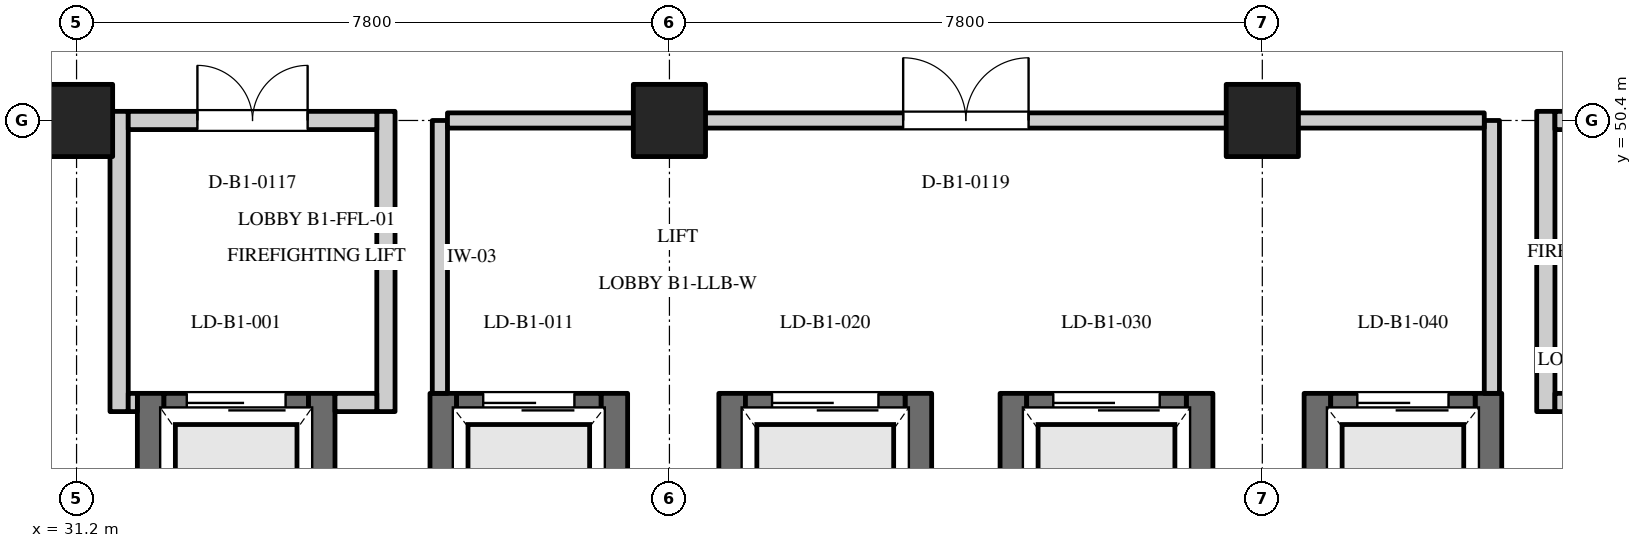
"""IFC4 building model, lengths in metres.
Left out: names, types, materials, properties, quantities, classifications, styles, units other than length and angle.
Written with IfcOpenShell. Run it as: python <this file> out.ifc"""

import sys

from ifc_helpers import new_model, si_unit, direction, frame, frame_2d, origin, origin_2d, place, context, subcontext, project, spatial, rectangle, extrude, element, fill, save


model = new_model("IFC4")
c1 = context("Model", 3, precision=1e-05, world=origin(), true_north=direction((0.0, 1.0)))
c2 = subcontext(c1, "Body", "Model", "MODEL_VIEW")
j1 = project(units=[si_unit("LENGTHUNIT", "METRE"), si_unit("PLANEANGLEUNIT", "RADIAN")], contexts=[c1])
p1 = place(None, origin())
s1 = spatial("IfcSite", under=j1, at=p1, CompositionType="ELEMENT")
p2 = place(p1, origin())
s2 = spatial("IfcBuilding", under=s1, at=p2, CompositionType="ELEMENT")
p3 = place(p2, frame((0.0, 0.0, -4.5)))
s3 = spatial("IfcBuildingStorey", under=s2, at=p3, CompositionType="ELEMENT", Elevation=-4.5)
for number, where, z_axis, x_axis in (
    (1, (31.2, 50.4, 0.0), (0.0, 0.0, 1.0), (1.0, 0.0, 0.0)),
    (2, (39.0, 50.4, 0.0), (0.0, 0.0, 1.0), (1.0, 0.0, 0.0)),
    (3, (46.8, 50.4, 0.0), (0.0, 0.0, 1.0), (1.0, 0.0, 0.0)),
):
    element("IfcColumn", number, at=place(p3, frame(where, z_axis=z_axis, x_axis=x_axis)), inside=s3, PredefinedType="COLUMN", context=c2, shape_type="SweptSolid", body=[
        extrude(rectangle(XDim=0.95, YDim=0.95, at=origin_2d()), origin(), (0.0, 0.0, 1.0), 4.5),
    ])
for number, where, z_axis, x_axis in (
    (4, (32.175, 43.06, 0.0), (0.0, 0.0, 1.0), (0.0, 1.0, 0.0)),
    (5, (34.425, 43.06, 0.0), (0.0, 0.0, 1.0), (0.0, 1.0, 0.0)),
):
    element("IfcWall", number, at=place(p3, frame(where, z_axis=z_axis, x_axis=x_axis)), inside=s3, PredefinedType="SHEAR", context=c2, shape_type="SweptSolid", body=[
        extrude(rectangle(XDim=3.75, YDim=0.35, at=frame_2d((1.875, 0.0))), origin(), (0.0, 0.0, 1.0), 4.5),
    ])
p4 = place(p3, frame((32.35, 46.635, 0.0), z_axis=(0.0, 0.0, 1.0), x_axis=(1.0, 0.0, 0.0)))
e6 = element("IfcWall", 6, at=p4, inside=s3, PredefinedType="SHEAR", context=c2, shape_type="SweptSolid", body=[
    extrude(rectangle(XDim=1.9, YDim=0.35, at=frame_2d((0.95, 0.0))), origin(), (0.0, 0.0, 1.0), 4.15),
])
p5 = place(p4, frame((0.3, 0.0, 0.0)))
e7 = element("IfcOpeningElement", 7, at=p5, cuts=e6, PredefinedType="OPENING", context=c2, shape_type="SweptSolid", body=[
    extrude(rectangle(XDim=1.3, YDim=2.2, at=frame_2d((0.65, 1.1))), frame((0.0, 0.187, 0.0), z_axis=(0.0, -1.0, 0.0), x_axis=(1.0, 0.0, 0.0)), (0.0, 0.0, 1.0), 0.374),
])
for number, where, z_axis, x_axis in (
    (8, (36.025, 43.36, 0.0), (0.0, 0.0, 1.0), (0.0, 1.0, 0.0)),
    (9, (38.275, 43.36, 0.0), (0.0, 0.0, 1.0), (0.0, 1.0, 0.0)),
):
    element("IfcWall", number, at=place(p3, frame(where, z_axis=z_axis, x_axis=x_axis)), inside=s3, PredefinedType="SHEAR", context=c2, shape_type="SweptSolid", body=[
        extrude(rectangle(XDim=3.45, YDim=0.35, at=frame_2d((1.725, 0.0))), origin(), (0.0, 0.0, 1.0), 4.5),
    ])
p6 = place(p3, frame((36.2, 46.635, 0.0), z_axis=(0.0, 0.0, 1.0), x_axis=(1.0, 0.0, 0.0)))
e10 = element("IfcWall", 10, at=p6, inside=s3, PredefinedType="SHEAR", context=c2, shape_type="SweptSolid", body=[
    extrude(rectangle(XDim=1.9, YDim=0.35, at=frame_2d((0.95, 0.0))), origin(), (0.0, 0.0, 1.0), 4.15),
])
p7 = place(p6, frame((0.35, 0.0, 0.0)))
e11 = element("IfcOpeningElement", 11, at=p7, cuts=e10, PredefinedType="OPENING", context=c2, shape_type="SweptSolid", body=[
    extrude(rectangle(XDim=1.2, YDim=2.2, at=frame_2d((0.6, 1.1))), frame((0.0, 0.187, 0.0), z_axis=(0.0, -1.0, 0.0), x_axis=(1.0, 0.0, 0.0)), (0.0, 0.0, 1.0), 0.374),
])
for number, where, z_axis, x_axis in (
    (12, (39.825, 42.76, 0.0), (0.0, 0.0, 1.0), (0.0, 1.0, 0.0)),
    (13, (42.275, 42.76, 0.0), (0.0, 0.0, 1.0), (0.0, 1.0, 0.0)),
):
    element("IfcWall", number, at=place(p3, frame(where, z_axis=z_axis, x_axis=x_axis)), inside=s3, PredefinedType="SHEAR", context=c2, shape_type="SweptSolid", body=[
        extrude(rectangle(XDim=4.05, YDim=0.35, at=frame_2d((2.025, 0.0))), origin(), (0.0, 0.0, 1.0), 4.5),
    ])
p8 = place(p3, frame((40.0, 46.635, 0.0), z_axis=(0.0, 0.0, 1.0), x_axis=(1.0, 0.0, 0.0)))
e14 = element("IfcWall", 14, at=p8, inside=s3, PredefinedType="SHEAR", context=c2, shape_type="SweptSolid", body=[
    extrude(rectangle(XDim=2.1, YDim=0.35, at=frame_2d((1.05, 0.0))), origin(), (0.0, 0.0, 1.0), 4.15),
])
p9 = place(p8, frame((0.35, 0.0, 0.0)))
e15 = element("IfcOpeningElement", 15, at=p9, cuts=e14, PredefinedType="OPENING", context=c2, shape_type="SweptSolid", body=[
    extrude(rectangle(XDim=1.4, YDim=2.2, at=frame_2d((0.7, 1.1))), frame((0.0, 0.187, 0.0), z_axis=(0.0, -1.0, 0.0), x_axis=(1.0, 0.0, 0.0)), (0.0, 0.0, 1.0), 0.374),
])
for number, where, z_axis, x_axis in (
    (16, (43.525, 42.76, 0.0), (0.0, 0.0, 1.0), (0.0, 1.0, 0.0)),
    (17, (45.975, 42.76, 0.0), (0.0, 0.0, 1.0), (0.0, 1.0, 0.0)),
):
    element("IfcWall", number, at=place(p3, frame(where, z_axis=z_axis, x_axis=x_axis)), inside=s3, PredefinedType="SHEAR", context=c2, shape_type="SweptSolid", body=[
        extrude(rectangle(XDim=4.05, YDim=0.35, at=frame_2d((2.025, 0.0))), origin(), (0.0, 0.0, 1.0), 4.5),
    ])
p10 = place(p3, frame((43.7, 46.635, 0.0), z_axis=(0.0, 0.0, 1.0), x_axis=(1.0, 0.0, 0.0)))
e18 = element("IfcWall", 18, at=p10, inside=s3, PredefinedType="SHEAR", context=c2, shape_type="SweptSolid", body=[
    extrude(rectangle(XDim=2.1, YDim=0.35, at=frame_2d((1.05, 0.0))), origin(), (0.0, 0.0, 1.0), 4.15),
])
p11 = place(p10, frame((0.35, 0.0, 0.0)))
e19 = element("IfcOpeningElement", 19, at=p11, cuts=e18, PredefinedType="OPENING", context=c2, shape_type="SweptSolid", body=[
    extrude(rectangle(XDim=1.4, YDim=2.2, at=frame_2d((0.7, 1.1))), frame((0.0, 0.187, 0.0), z_axis=(0.0, -1.0, 0.0), x_axis=(1.0, 0.0, 0.0)), (0.0, 0.0, 1.0), 0.374),
])
for number, where, z_axis, x_axis in (
    (20, (47.525, 43.36, 0.0), (0.0, 0.0, 1.0), (0.0, 1.0, 0.0)),
    (21, (49.775, 43.36, 0.0), (0.0, 0.0, 1.0), (0.0, 1.0, 0.0)),
):
    element("IfcWall", number, at=place(p3, frame(where, z_axis=z_axis, x_axis=x_axis)), inside=s3, PredefinedType="SHEAR", context=c2, shape_type="SweptSolid", body=[
        extrude(rectangle(XDim=3.45, YDim=0.35, at=frame_2d((1.725, 0.0))), origin(), (0.0, 0.0, 1.0), 4.5),
    ])
p12 = place(p3, frame((47.7, 46.635, 0.0), z_axis=(0.0, 0.0, 1.0), x_axis=(1.0, 0.0, 0.0)))
e22 = element("IfcWall", 22, at=p12, inside=s3, PredefinedType="SHEAR", context=c2, shape_type="SweptSolid", body=[
    extrude(rectangle(XDim=1.9, YDim=0.35, at=frame_2d((0.95, 0.0))), origin(), (0.0, 0.0, 1.0), 4.15),
])
p13 = place(p12, frame((0.35, 0.0, 0.0)))
e23 = element("IfcOpeningElement", 23, at=p13, cuts=e22, PredefinedType="OPENING", context=c2, shape_type="SweptSolid", body=[
    extrude(rectangle(XDim=1.2, YDim=2.2, at=frame_2d((0.6, 1.1))), frame((0.0, 0.187, 0.0), z_axis=(0.0, -1.0, 0.0), x_axis=(1.0, 0.0, 0.0)), (0.0, 0.0, 1.0), 0.374),
])
for number, where, z_axis, x_axis in (
    (24, (31.76, 46.57, 0.0), (0.0, 0.0, 1.0), (0.0, 1.0, 0.0)),
    (25, (35.27, 46.57, 0.0), (0.0, 0.0, 1.0), (0.0, 1.0, 0.0)),
):
    element("IfcWall", number, at=place(p3, frame(where, z_axis=z_axis, x_axis=x_axis)), inside=s3, PredefinedType="STANDARD", context=c2, shape_type="SweptSolid", body=[
        extrude(rectangle(XDim=3.95, YDim=0.24, at=frame_2d((1.975, 0.0))), origin(), (0.0, 0.0, 1.0), 3.4),
    ])
p14 = place(p3, frame((31.88, 46.69, 0.0), z_axis=(0.0, 0.0, 1.0), x_axis=(1.0, 0.0, 0.0)))
e26 = element("IfcWall", 26, at=p14, inside=s3, PredefinedType="STANDARD", context=c2, shape_type="SweptSolid", body=[
    extrude(rectangle(XDim=0.12, YDim=0.24, at=frame_2d((0.06, 0.0))), origin(), (0.0, 0.0, 1.0), 3.4),
])
p15 = place(p3, frame((34.6, 46.69, 0.0), z_axis=(0.0, 0.0, 1.0), x_axis=(1.0, 0.0, 0.0)))
e27 = element("IfcWall", 27, at=p15, inside=s3, PredefinedType="STANDARD", context=c2, shape_type="SweptSolid", body=[
    extrude(rectangle(XDim=0.55, YDim=0.24, at=frame_2d((0.275, 0.0))), origin(), (0.0, 0.0, 1.0), 3.4),
])
p16 = place(p3, frame((31.88, 50.4, 0.0), z_axis=(0.0, 0.0, 1.0), x_axis=(1.0, 0.0, 0.0)))
e28 = element("IfcWall", 28, at=p16, inside=s3, PredefinedType="STANDARD", context=c2, shape_type="SweptSolid", body=[
    extrude(rectangle(XDim=3.27, YDim=0.24, at=frame_2d((1.635, 0.0))), origin(), (0.0, 0.0, 1.0), 3.4),
])
p17 = place(p16, frame((0.91, 0.0, 0.0)))
e29 = element("IfcOpeningElement", 29, at=p17, cuts=e28, PredefinedType="OPENING", context=c2, shape_type="SweptSolid", body=[
    extrude(rectangle(XDim=1.45, YDim=2.2, at=frame_2d((0.725, 1.1))), frame((0.0, 0.132, 0.0), z_axis=(0.0, -1.0, 0.0), x_axis=(1.0, 0.0, 0.0)), (0.0, 0.0, 1.0), 0.264),
])
p18 = place(p3, frame((50.53, 46.57, 0.0), z_axis=(0.0, 0.0, 1.0), x_axis=(0.0, 1.0, 0.0)))
e30 = element("IfcWall", 30, at=p18, inside=s3, PredefinedType="STANDARD", context=c2, shape_type="SweptSolid", body=[
    extrude(rectangle(XDim=3.95, YDim=0.24, at=frame_2d((1.975, 0.0))), origin(), (0.0, 0.0, 1.0), 3.4),
])
p19 = place(p3, frame((50.65, 46.69, 0.0), z_axis=(0.0, 0.0, 1.0), x_axis=(1.0, 0.0, 0.0)))
e31 = element("IfcWall", 31, at=p19, inside=s3, PredefinedType="STANDARD", context=c2, shape_type="SweptSolid", body=[
    extrude(rectangle(XDim=0.5, YDim=0.24, at=frame_2d((0.25, 0.0))), origin(), (0.0, 0.0, 1.0), 3.4),
])
p20 = place(p3, frame((50.65, 50.4, 0.0), z_axis=(0.0, 0.0, 1.0), x_axis=(1.0, 0.0, 0.0)))
e32 = element("IfcWall", 32, at=p20, inside=s3, PredefinedType="STANDARD", context=c2, shape_type="SweptSolid", body=[
    extrude(rectangle(XDim=3.37, YDim=0.24, at=frame_2d((1.685, 0.0))), origin(), (0.0, 0.0, 1.0), 3.4),
])
p21 = place(p20, frame((0.96, 0.0, 0.0)))
e33 = element("IfcOpeningElement", 33, at=p21, cuts=e32, PredefinedType="OPENING", context=c2, shape_type="SweptSolid", body=[
    extrude(rectangle(XDim=1.45, YDim=2.2, at=frame_2d((0.725, 1.1))), frame((0.0, 0.132, 0.0), z_axis=(0.0, -1.0, 0.0), x_axis=(1.0, 0.0, 0.0)), (0.0, 0.0, 1.0), 0.264),
])
for number, where, z_axis, x_axis in (
    (34, (35.98, 46.81, 0.0), (0.0, 0.0, 1.0), (0.0, 1.0, 0.0)),
    (35, (49.82, 46.81, 0.0), (0.0, 0.0, 1.0), (0.0, 1.0, 0.0)),
):
    element("IfcWall", number, at=place(p3, frame(where, z_axis=z_axis, x_axis=x_axis)), inside=s3, PredefinedType="STANDARD", context=c2, shape_type="SweptSolid", body=[
        extrude(rectangle(XDim=3.59, YDim=0.2, at=frame_2d((1.795, 0.0))), origin(), (0.0, 0.0, 1.0), 3.4),
    ])
p22 = place(p3, frame((36.08, 50.4, 0.0), z_axis=(0.0, 0.0, 1.0), x_axis=(1.0, 0.0, 0.0)))
e36 = element("IfcWall", 36, at=p22, inside=s3, PredefinedType="STANDARD", context=c2, shape_type="SweptSolid", body=[
    extrude(rectangle(XDim=13.64, YDim=0.2, at=frame_2d((6.82, 0.0))), origin(), (0.0, 0.0, 1.0), 3.4),
])
p23 = place(p22, frame((5.995, 0.0, 0.0)))
e37 = element("IfcOpeningElement", 37, at=p23, cuts=e36, PredefinedType="OPENING", context=c2, shape_type="SweptSolid", body=[
    extrude(rectangle(XDim=1.65, YDim=2.25, at=frame_2d((0.825, 1.125))), frame((0.0, 0.112, 0.0), z_axis=(0.0, -1.0, 0.0), x_axis=(1.0, 0.0, 0.0)), (0.0, 0.0, 1.0), 0.224),
])
p24 = place(p5, origin())
e38 = element("IfcDoor", 38, at=p24, inside=s3, OperationType="SLIDING_TO_LEFT", PredefinedType="DOOR", context=c2, shape_type="SweptSolid", body=[
    extrude(rectangle(XDim=1.3, YDim=2.2, at=frame_2d((0.65, 1.1))), frame((0.0, 0.025, 0.0), z_axis=(0.0, -1.0, 0.0), x_axis=(1.0, 0.0, 0.0)), (0.0, 0.0, 1.0), 0.05),
])
fill(e7, e38)
p25 = place(p7, origin())
e39 = element("IfcDoor", 39, at=p25, inside=s3, OperationType="SLIDING_TO_LEFT", PredefinedType="DOOR", context=c2, shape_type="SweptSolid", body=[
    extrude(rectangle(XDim=1.2, YDim=2.2, at=frame_2d((0.6, 1.1))), frame((0.0, 0.025, 0.0), z_axis=(0.0, -1.0, 0.0), x_axis=(1.0, 0.0, 0.0)), (0.0, 0.0, 1.0), 0.05),
])
fill(e11, e39)
p26 = place(p9, origin())
e40 = element("IfcDoor", 40, at=p26, inside=s3, OperationType="SLIDING_TO_LEFT", PredefinedType="DOOR", context=c2, shape_type="SweptSolid", body=[
    extrude(rectangle(XDim=1.4, YDim=2.2, at=frame_2d((0.7, 1.1))), frame((0.0, 0.025, 0.0), z_axis=(0.0, -1.0, 0.0), x_axis=(1.0, 0.0, 0.0)), (0.0, 0.0, 1.0), 0.05),
])
fill(e15, e40)
p27 = place(p11, origin())
e41 = element("IfcDoor", 41, at=p27, inside=s3, OperationType="SLIDING_TO_LEFT", PredefinedType="DOOR", context=c2, shape_type="SweptSolid", body=[
    extrude(rectangle(XDim=1.4, YDim=2.2, at=frame_2d((0.7, 1.1))), frame((0.0, 0.025, 0.0), z_axis=(0.0, -1.0, 0.0), x_axis=(1.0, 0.0, 0.0)), (0.0, 0.0, 1.0), 0.05),
])
fill(e19, e41)
p28 = place(p13, origin())
e42 = element("IfcDoor", 42, at=p28, inside=s3, OperationType="SLIDING_TO_LEFT", PredefinedType="DOOR", context=c2, shape_type="SweptSolid", body=[
    extrude(rectangle(XDim=1.2, YDim=2.2, at=frame_2d((0.6, 1.1))), frame((0.0, 0.025, 0.0), z_axis=(0.0, -1.0, 0.0), x_axis=(1.0, 0.0, 0.0)), (0.0, 0.0, 1.0), 0.05),
])
fill(e23, e42)
p29 = place(p17, origin())
e43 = element("IfcDoor", 43, at=p29, inside=s3, OperationType="DOUBLE_DOOR_SINGLE_SWING", PredefinedType="DOOR", context=c2, shape_type="SweptSolid", body=[
    extrude(rectangle(XDim=1.45, YDim=2.2, at=frame_2d((0.725, 1.1))), frame((0.0, 0.025, 0.0), z_axis=(0.0, -1.0, 0.0), x_axis=(1.0, 0.0, 0.0)), (0.0, 0.0, 1.0), 0.05),
])
fill(e29, e43)
p30 = place(p23, origin())
e44 = element("IfcDoor", 44, at=p30, inside=s3, OperationType="DOUBLE_DOOR_SINGLE_SWING", PredefinedType="DOOR", context=c2, shape_type="SweptSolid", body=[
    extrude(rectangle(XDim=1.65, YDim=2.25, at=frame_2d((0.825, 1.125))), frame((0.0, 0.025, 0.0), z_axis=(0.0, -1.0, 0.0), x_axis=(1.0, 0.0, 0.0)), (0.0, 0.0, 1.0), 0.05),
])
fill(e37, e44)
save(model, sys.argv[1])
